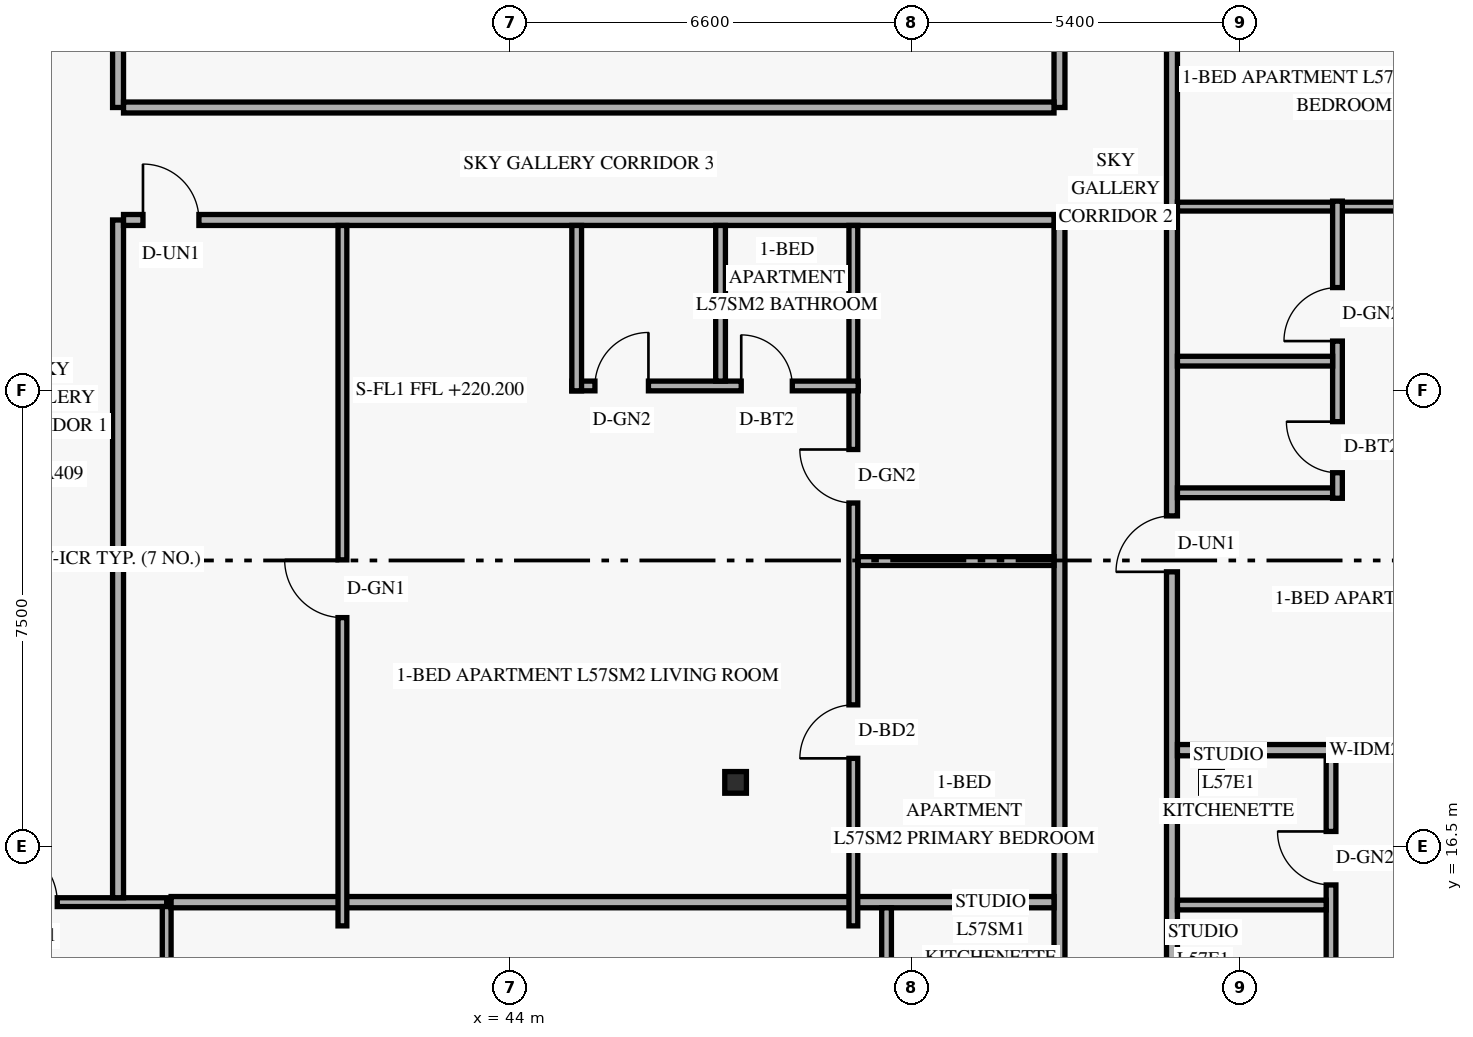
"""IFC4 building model, lengths in metres.
Left out: names, types, materials, properties, quantities, classifications, styles, units other than length and angle.
Written with IfcOpenShell. Run it as: python <this file> out.ifc"""

import sys

from ifc_helpers import new_model, si_unit, direction, frame, frame_2d, origin, origin_2d, place, context, subcontext, project, spatial, rectangle, hollow_rectangle, extrude, element, fill, save


model = new_model("IFC4")
c1 = context("Model", 3, precision=1e-05, world=origin(), true_north=direction((0.0, 1.0)))
c2 = subcontext(c1, "Body", "Model", "MODEL_VIEW")
j1 = project(units=[si_unit("LENGTHUNIT", "METRE"), si_unit("PLANEANGLEUNIT", "RADIAN")], contexts=[c1])
p1 = place(None, origin())
s1 = spatial("IfcSite", under=j1, at=p1, CompositionType="ELEMENT")
p2 = place(p1, origin())
s2 = spatial("IfcBuilding", under=s1, at=p2, CompositionType="ELEMENT")
p3 = place(p2, frame((0.0, 0.0, 220.2)))
s3 = spatial("IfcBuildingStorey", under=s2, at=p3, CompositionType="ELEMENT", Elevation=220.2)
p4 = place(p3, frame((47.643, 17.55, 0.0), z_axis=(0.034971136209, 0.0, 0.999388322742), x_axis=(0.0, 1.0, 0.0)))
e1 = element("IfcColumn", 1, at=p4, inside=s3, PredefinedType="COLUMN", context=c2, shape_type="SweptSolid", body=[
    extrude(hollow_rectangle(XDim=0.356, YDim=0.356, WallThickness=0.016, at=origin_2d()), origin(), (0.0, 0.0, 1.0), 3.602),
])
p5 = place(p3, frame((55.428, 17.55, 0.0), z_axis=(0.057884606321, 0.0, 0.998323280481), x_axis=(0.0, 1.0, 0.0)))
e2 = element("IfcColumn", 2, at=p5, inside=s3, PredefinedType="COLUMN", context=c2, shape_type="SweptSolid", body=[
    extrude(hollow_rectangle(XDim=0.356, YDim=0.356, WallThickness=0.016, at=origin_2d()), origin(), (0.0, 0.0, 1.0), 3.606),
])
p6 = place(p3, frame((32.722, 15.58, 0.0), z_axis=(0.0, 0.0, 1.0), x_axis=(1.0, 0.0, 0.0)))
e3 = element("IfcWall", 3, at=p6, inside=s3, PredefinedType="PARTITIONING", context=c2, shape_type="SweptSolid", body=[
    extrude(rectangle(XDim=5.628, YDim=0.145, at=frame_2d((2.814, 0.0))), origin(), (0.0, 0.0, 1.0), 2.803),
])
p7 = place(p6, frame((2.877, 0.0, 0.0)))
e4 = element("IfcOpeningElement", 4, at=p7, cuts=e3, PredefinedType="OPENING", context=c2, shape_type="SweptSolid", body=[
    extrude(rectangle(XDim=0.95, YDim=2.15, at=frame_2d((0.475, 1.075))), frame((0.0, 0.083, 0.0), z_axis=(0.0, -1.0, 0.0), x_axis=(1.0, 0.0, 0.0)), (0.0, 0.0, 1.0), 0.165),
])
p8 = place(p3, frame((38.35, 9.25, 0.0), z_axis=(0.0, 0.0, 1.0), x_axis=(0.0, 1.0, 0.0)))
e5 = element("IfcWall", 5, at=p8, inside=s3, PredefinedType="PARTITIONING", context=c2, shape_type="SweptSolid", body=[
    extrude(rectangle(XDim=6.258, YDim=0.145, at=frame_2d((3.129, 0.0))), origin(), (0.0, 0.0, 1.0), 2.803),
])
p9 = place(p3, frame((37.55, 15.653, 0.0), z_axis=(0.0, 0.0, 1.0), x_axis=(0.0, 1.0, 0.0)))
e6 = element("IfcWall", 6, at=p9, inside=s3, PredefinedType="STANDARD", context=c2, shape_type="SweptSolid", body=[
    extrude(rectangle(XDim=11.147, YDim=0.18, at=frame_2d((5.574, 0.0))), origin(), (0.0, 0.0, 1.0), 2.803),
])
p10 = place(p3, frame((37.55, 28.65, 0.0), z_axis=(0.0, 0.0, 1.0), x_axis=(0.0, 1.0, 0.0)))
e7 = element("IfcWall", 7, at=p10, inside=s3, PredefinedType="STANDARD", context=c2, shape_type="SweptSolid", body=[
    extrude(rectangle(XDim=2.628, YDim=0.18, at=frame_2d((1.314, 0.0))), origin(), (0.0, 0.0, 1.0), 2.803),
])
p11 = place(p3, frame((53.033, 5.77, 0.0), z_axis=(0.0, 0.0, 1.0), x_axis=(0.0, 1.0, 0.0)))
e8 = element("IfcWall", 8, at=p11, inside=s3, PredefinedType="STANDARD", context=c2, shape_type="SweptSolid", body=[
    extrude(rectangle(XDim=21.03, YDim=0.18, at=frame_2d((10.515, 0.0))), origin(), (0.0, 0.0, 1.0), 2.803),
])
p12 = place(p11, frame((3.87, 0.0, 0.0)))
e9 = element("IfcOpeningElement", 9, at=p12, cuts=e8, PredefinedType="OPENING", context=c2, shape_type="SweptSolid", body=[
    extrude(rectangle(XDim=0.92, YDim=2.15, at=frame_2d((0.46, 1.075))), frame((0.0, 0.1, 0.0), z_axis=(0.0, -1.0, 0.0), x_axis=(1.0, 0.0, 0.0)), (0.0, 0.0, 1.0), 0.2),
])
p13 = place(p3, frame((53.033, 28.65, 0.0), z_axis=(0.0, 0.0, 1.0), x_axis=(0.0, 1.0, 0.0)))
e10 = element("IfcWall", 10, at=p13, inside=s3, PredefinedType="STANDARD", context=c2, shape_type="SweptSolid", body=[
    extrude(rectangle(XDim=13.58, YDim=0.18, at=frame_2d((6.79, 0.0))), origin(), (0.0, 0.0, 1.0), 2.803),
])
p14 = place(p13, frame((4.2, 0.0, 0.0)))
e11 = element("IfcOpeningElement", 11, at=p14, cuts=e10, PredefinedType="OPENING", context=c2, shape_type="SweptSolid", body=[
    extrude(rectangle(XDim=0.92, YDim=2.15, at=frame_2d((0.46, 1.075))), frame((0.0, 0.1, 0.0), z_axis=(0.0, -1.0, 0.0), x_axis=(1.0, 0.0, 0.0)), (0.0, 0.0, 1.0), 0.2),
])
p15 = place(p3, frame((37.64, 26.8, 0.0), z_axis=(0.0, 0.0, 1.0), x_axis=(1.0, 0.0, 0.0)))
e12 = element("IfcWall", 12, at=p15, inside=s3, PredefinedType="STANDARD", context=c2, shape_type="SweptSolid", body=[
    extrude(rectangle(XDim=15.303, YDim=0.18, at=frame_2d((7.651, 0.0))), origin(), (0.0, 0.0, 1.0), 2.803),
])
p16 = place(p15, frame((0.32, 0.0, 0.0)))
e13 = element("IfcOpeningElement", 13, at=p16, cuts=e12, PredefinedType="OPENING", context=c2, shape_type="SweptSolid", body=[
    extrude(rectangle(XDim=0.92, YDim=2.15, at=frame_2d((0.46, 1.075))), frame((0.0, 0.1, 0.0), z_axis=(0.0, -1.0, 0.0), x_axis=(1.0, 0.0, 0.0)), (0.0, 0.0, 1.0), 0.2),
])
p17 = place(p3, frame((37.64, 28.65, 0.0), z_axis=(0.0, 0.0, 1.0), x_axis=(1.0, 0.0, 0.0)))
e14 = element("IfcWall", 14, at=p17, inside=s3, PredefinedType="STANDARD", context=c2, shape_type="SweptSolid", body=[
    extrude(rectangle(XDim=15.303, YDim=0.18, at=frame_2d((7.651, 0.0))), origin(), (0.0, 0.0, 1.0), 2.803),
])
p18 = place(p3, frame((54.883, 5.77, 0.0), z_axis=(0.0, 0.0, 1.0), x_axis=(0.0, 1.0, 0.0)))
e15 = element("IfcWall", 15, at=p18, inside=s3, PredefinedType="STANDARD", context=c2, shape_type="SweptSolid", body=[
    extrude(rectangle(XDim=36.46, YDim=0.18, at=frame_2d((18.23, 0.0))), origin(), (0.0, 0.0, 1.0), 2.803),
])
p19 = place(p18, frame((6.37, 0.0, 0.0)))
e16 = element("IfcOpeningElement", 16, at=p19, cuts=e15, PredefinedType="OPENING", context=c2, shape_type="SweptSolid", body=[
    extrude(rectangle(XDim=0.92, YDim=2.15, at=frame_2d((0.46, 1.075))), frame((0.0, 0.1, 0.0), z_axis=(0.0, -1.0, 0.0), x_axis=(1.0, 0.0, 0.0)), (0.0, 0.0, 1.0), 0.2),
])
p20 = place(p18, frame((15.243, 0.0, 0.0)))
e17 = element("IfcOpeningElement", 17, at=p20, cuts=e15, PredefinedType="OPENING", context=c2, shape_type="SweptSolid", body=[
    extrude(rectangle(XDim=0.92, YDim=2.15, at=frame_2d((0.46, 1.075))), frame((0.0, 0.1, 0.0), z_axis=(0.0, -1.0, 0.0), x_axis=(1.0, 0.0, 0.0)), (0.0, 0.0, 1.0), 0.2),
])
p21 = place(p18, frame((26.905, 0.0, 0.0)))
e18 = element("IfcOpeningElement", 18, at=p21, cuts=e15, PredefinedType="OPENING", context=c2, shape_type="SweptSolid", body=[
    extrude(rectangle(XDim=0.92, YDim=2.15, at=frame_2d((0.46, 1.075))), frame((0.0, 0.1, 0.0), z_axis=(0.0, -1.0, 0.0), x_axis=(1.0, 0.0, 0.0)), (0.0, 0.0, 1.0), 0.2),
])
p22 = place(p3, frame((57.499, 13.35, 0.0), z_axis=(0.0, 0.0, 1.0), x_axis=(0.0, 1.0, 0.0)))
e19 = element("IfcWall", 19, at=p22, inside=s3, PredefinedType="PLUMBINGWALL", context=c2, shape_type="SweptSolid", body=[
    extrude(rectangle(XDim=4.73, YDim=0.16, at=frame_2d((2.365, 0.0))), origin(), (0.0, 0.0, 1.0), 3.36),
])
p23 = place(p22, frame((0.42, 0.0, 0.0)))
e20 = element("IfcOpeningElement", 20, at=p23, cuts=e19, PredefinedType="OPENING", context=c2, shape_type="SweptSolid", body=[
    extrude(rectangle(XDim=0.84, YDim=2.12, at=frame_2d((0.42, 1.06))), frame((0.0, 0.09, 0.0), z_axis=(0.0, -1.0, 0.0), x_axis=(1.0, 0.0, 0.0)), (0.0, 0.0, 1.0), 0.18),
])
p24 = place(p22, frame((2.513, 0.0, 0.0)))
e21 = element("IfcOpeningElement", 21, at=p24, cuts=e19, PredefinedType="OPENING", context=c2, shape_type="SweptSolid", body=[
    extrude(rectangle(XDim=0.88, YDim=2.12, at=frame_2d((0.44, 1.06))), frame((0.0, 0.09, 0.0), z_axis=(0.0, -1.0, 0.0), x_axis=(1.0, 0.0, 0.0)), (0.0, 0.0, 1.0), 0.18),
])
p25 = place(p3, frame((54.973, 15.533, 0.0), z_axis=(0.0, 0.0, 1.0), x_axis=(1.0, 0.0, 0.0)))
e22 = element("IfcWall", 22, at=p25, inside=s3, PredefinedType="PLUMBINGWALL", context=c2, shape_type="SweptSolid", body=[
    extrude(rectangle(XDim=2.446, YDim=0.16, at=frame_2d((1.223, 0.0))), origin(), (0.0, 0.0, 1.0), 2.879),
])
p26 = place(p3, frame((54.973, 18.08, 0.0), z_axis=(0.0, 0.0, 1.0), x_axis=(1.0, 0.0, 0.0)))
e23 = element("IfcWall", 23, at=p26, inside=s3, PredefinedType="PARTITIONING", context=c2, shape_type="SweptSolid", body=[
    extrude(rectangle(XDim=7.157, YDim=0.185, at=frame_2d((3.579, 0.0))), origin(), (0.0, 0.0, 1.0), 2.879),
])
p27 = place(p3, frame((54.973, 27.02, 0.0), z_axis=(0.0, 0.0, 1.0), x_axis=(1.0, 0.0, 0.0)))
e24 = element("IfcWall", 24, at=p27, inside=s3, PredefinedType="PARTITIONING", context=c2, shape_type="SweptSolid", body=[
    extrude(rectangle(XDim=7.157, YDim=0.145, at=frame_2d((3.579, 0.0))), origin(), (0.0, 0.0, 1.0), 2.879),
])
p28 = place(p27, frame((4.594, 0.0, 0.0)))
e25 = element("IfcOpeningElement", 25, at=p28, cuts=e24, PredefinedType="OPENING", context=c2, shape_type="SweptSolid", body=[
    extrude(rectangle(XDim=0.9, YDim=2.14, at=frame_2d((0.45, 1.07))), frame((0.0, 0.083, 0.0), z_axis=(0.0, -1.0, 0.0), x_axis=(1.0, 0.0, 0.0)), (0.0, 0.0, 1.0), 0.165),
])
p29 = place(p3, frame((54.973, 22.313, 0.0), z_axis=(0.0, 0.0, 1.0), x_axis=(1.0, 0.0, 0.0)))
e26 = element("IfcWall", 26, at=p29, inside=s3, PredefinedType="PLUMBINGWALL", context=c2, shape_type="SweptSolid", body=[
    extrude(rectangle(XDim=2.712, YDim=0.16, at=frame_2d((1.356, 0.0))), origin(), (0.0, 0.0, 1.0), 2.879),
])
p30 = place(p3, frame((57.605, 22.223, 0.0), z_axis=(0.0, 0.0, 1.0), x_axis=(0.0, 1.0, 0.0)))
e27 = element("IfcWall", 27, at=p30, inside=s3, PredefinedType="PLUMBINGWALL", context=c2, shape_type="SweptSolid", body=[
    extrude(rectangle(XDim=4.887, YDim=0.16, at=frame_2d((2.444, 0.0))), origin(), (0.0, 0.0, 1.0), 3.36),
])
p31 = place(p30, frame((0.42, 0.0, 0.0)))
e28 = element("IfcOpeningElement", 28, at=p31, cuts=e27, PredefinedType="OPENING", context=c2, shape_type="SweptSolid", body=[
    extrude(rectangle(XDim=0.84, YDim=2.12, at=frame_2d((0.42, 1.06))), frame((0.0, 0.09, 0.0), z_axis=(0.0, -1.0, 0.0), x_axis=(1.0, 0.0, 0.0)), (0.0, 0.0, 1.0), 0.18),
])
p32 = place(p30, frame((2.585, 0.0, 0.0)))
e29 = element("IfcOpeningElement", 29, at=p32, cuts=e27, PredefinedType="OPENING", context=c2, shape_type="SweptSolid", body=[
    extrude(rectangle(XDim=0.88, YDim=2.12, at=frame_2d((0.44, 1.06))), frame((0.0, 0.09, 0.0), z_axis=(0.0, -1.0, 0.0), x_axis=(1.0, 0.0, 0.0)), (0.0, 0.0, 1.0), 0.18),
])
p33 = place(p3, frame((54.973, 24.478, 0.0), z_axis=(0.0, 0.0, 1.0), x_axis=(1.0, 0.0, 0.0)))
e30 = element("IfcWall", 30, at=p33, inside=s3, PredefinedType="PLUMBINGWALL", context=c2, shape_type="SweptSolid", body=[
    extrude(rectangle(XDim=2.552, YDim=0.16, at=frame_2d((1.276, 0.0))), origin(), (0.0, 0.0, 1.0), 2.879),
])
p34 = place(p3, frame((38.423, 15.58, 0.0), z_axis=(0.0, 0.0, 1.0), x_axis=(1.0, 0.0, 0.0)))
e31 = element("IfcWall", 31, at=p34, inside=s3, PredefinedType="PARTITIONING", context=c2, shape_type="SweptSolid", body=[
    extrude(rectangle(XDim=14.52, YDim=0.185, at=frame_2d((7.26, 0.0))), origin(), (0.0, 0.0, 1.0), 2.803),
])
p35 = place(p3, frame((50.189, 10.85, 0.0), z_axis=(0.0, 0.0, 1.0), x_axis=(0.0, 1.0, 0.0)))
e32 = element("IfcWall", 32, at=p35, inside=s3, PredefinedType="PLUMBINGWALL", context=c2, shape_type="SweptSolid", body=[
    extrude(rectangle(XDim=4.637, YDim=0.16, at=frame_2d((2.319, 0.0))), origin(), (0.0, 0.0, 1.0), 3.039),
])
p36 = place(p35, frame((0.42, 0.0, 0.0)))
e33 = element("IfcOpeningElement", 33, at=p36, cuts=e32, PredefinedType="OPENING", context=c2, shape_type="SweptSolid", body=[
    extrude(rectangle(XDim=0.84, YDim=2.12, at=frame_2d((0.42, 1.06))), frame((0.0, 0.09, 0.0), z_axis=(0.0, -1.0, 0.0), x_axis=(1.0, 0.0, 0.0)), (0.0, 0.0, 1.0), 0.18),
])
p37 = place(p35, frame((2.513, 0.0, 0.0)))
e34 = element("IfcOpeningElement", 34, at=p37, cuts=e32, PredefinedType="OPENING", context=c2, shape_type="SweptSolid", body=[
    extrude(rectangle(XDim=0.88, YDim=2.12, at=frame_2d((0.44, 1.06))), frame((0.0, 0.09, 0.0), z_axis=(0.0, -1.0, 0.0), x_axis=(1.0, 0.0, 0.0)), (0.0, 0.0, 1.0), 0.18),
])
p38 = place(p3, frame((49.643, 15.19, 0.0), z_axis=(0.0, 0.0, 1.0), x_axis=(0.0, 1.0, 0.0)))
e35 = element("IfcWall", 35, at=p38, inside=s3, PredefinedType="PARTITIONING", context=c2, shape_type="SweptSolid", body=[
    extrude(rectangle(XDim=11.52, YDim=0.145, at=frame_2d((5.76, 0.0))), origin(), (0.0, 0.0, 1.0), 2.803),
])
p39 = place(p38, frame((2.755, 0.0, 0.0)))
e36 = element("IfcOpeningElement", 36, at=p39, cuts=e35, PredefinedType="OPENING", context=c2, shape_type="SweptSolid", body=[
    extrude(rectangle(XDim=0.88, YDim=2.14, at=frame_2d((0.44, 1.07))), frame((0.0, 0.083, 0.0), z_axis=(0.0, -1.0, 0.0), x_axis=(1.0, 0.0, 0.0)), (0.0, 0.0, 1.0), 0.165),
])
p40 = place(p38, frame((6.955, 0.0, 0.0)))
e37 = element("IfcOpeningElement", 37, at=p40, cuts=e35, PredefinedType="OPENING", context=c2, shape_type="SweptSolid", body=[
    extrude(rectangle(XDim=0.88, YDim=2.12, at=frame_2d((0.44, 1.06))), frame((0.0, 0.083, 0.0), z_axis=(0.0, -1.0, 0.0), x_axis=(1.0, 0.0, 0.0)), (0.0, 0.0, 1.0), 0.165),
])
p41 = place(p3, frame((45.013, 24.07, 0.0), z_axis=(0.0, 0.0, 1.0), x_axis=(1.0, 0.0, 0.0)))
e38 = element("IfcWall", 38, at=p41, inside=s3, PredefinedType="PLUMBINGWALL", context=c2, shape_type="SweptSolid", body=[
    extrude(rectangle(XDim=4.71, YDim=0.16, at=frame_2d((2.355, 0.0))), origin(), (0.0, 0.0, 1.0), 2.803),
])
p42 = place(p41, frame((0.38, 0.0, 0.0)))
e39 = element("IfcOpeningElement", 39, at=p42, cuts=e38, PredefinedType="OPENING", context=c2, shape_type="SweptSolid", body=[
    extrude(rectangle(XDim=0.88, YDim=2.12, at=frame_2d((0.44, 1.06))), frame((0.0, 0.09, 0.0), z_axis=(0.0, -1.0, 0.0), x_axis=(1.0, 0.0, 0.0)), (0.0, 0.0, 1.0), 0.18),
])
p43 = place(p41, frame((2.786, 0.0, 0.0)))
e40 = element("IfcOpeningElement", 40, at=p43, cuts=e38, PredefinedType="OPENING", context=c2, shape_type="SweptSolid", body=[
    extrude(rectangle(XDim=0.84, YDim=2.12, at=frame_2d((0.42, 1.06))), frame((0.0, 0.09, 0.0), z_axis=(0.0, -1.0, 0.0), x_axis=(1.0, 0.0, 0.0)), (0.0, 0.0, 1.0), 0.18),
])
p44 = place(p3, frame((45.093, 23.99, 0.0), z_axis=(0.0, 0.0, 1.0), x_axis=(0.0, 1.0, 0.0)))
e41 = element("IfcWall", 41, at=p44, inside=s3, PredefinedType="PLUMBINGWALL", context=c2, shape_type="SweptSolid", body=[
    extrude(rectangle(XDim=2.72, YDim=0.16, at=frame_2d((1.36, 0.0))), origin(), (0.0, 0.0, 1.0), 3.36),
])
p45 = place(p3, frame((47.459, 24.15, 0.0), z_axis=(0.0, 0.0, 1.0), x_axis=(0.0, 1.0, 0.0)))
e42 = element("IfcWall", 42, at=p45, inside=s3, PredefinedType="PLUMBINGWALL", context=c2, shape_type="SweptSolid", body=[
    extrude(rectangle(XDim=2.56, YDim=0.16, at=frame_2d((1.28, 0.0))), origin(), (0.0, 0.0, 1.0), 3.36),
])
p46 = place(p3, frame((41.24, 15.19, 0.0), z_axis=(0.0, 0.0, 1.0), x_axis=(0.0, 1.0, 0.0)))
e43 = element("IfcWall", 43, at=p46, inside=s3, PredefinedType="PARTITIONING", context=c2, shape_type="SweptSolid", body=[
    extrude(rectangle(XDim=11.52, YDim=0.145, at=frame_2d((5.76, 0.0))), origin(), (0.0, 0.0, 1.0), 2.803),
])
p47 = place(p46, frame((5.07, 0.0, 0.0)))
e44 = element("IfcOpeningElement", 44, at=p47, cuts=e43, PredefinedType="OPENING", context=c2, shape_type="SweptSolid", body=[
    extrude(rectangle(XDim=0.95, YDim=2.15, at=frame_2d((0.475, 1.075))), frame((0.0, 0.083, 0.0), z_axis=(0.0, -1.0, 0.0), x_axis=(1.0, 0.0, 0.0)), (0.0, 0.0, 1.0), 0.165),
])
p48 = place(p3, frame((49.723, 21.19, 0.0), z_axis=(0.0, 0.0, 1.0), x_axis=(1.0, 0.0, 0.0)))
e45 = element("IfcWall", 45, at=p48, inside=s3, PredefinedType="PARTITIONING", context=c2, shape_type="SweptSolid", body=[
    extrude(rectangle(XDim=3.22, YDim=0.145, at=frame_2d((1.61, 0.0))), origin(), (0.0, 0.0, 1.0), 3.36),
])
p49 = place(p7, origin())
e46 = element("IfcDoor", 46, at=p49, inside=s3, OperationType="SINGLE_SWING_LEFT", PredefinedType="DOOR", context=c2, shape_type="SweptSolid", body=[
    extrude(rectangle(XDim=0.95, YDim=2.15, at=frame_2d((0.475, 1.075))), frame((0.0, 0.025, 0.0), z_axis=(0.0, -1.0, 0.0), x_axis=(1.0, 0.0, 0.0)), (0.0, 0.0, 1.0), 0.05),
])
fill(e4, e46)
p50 = place(p24, origin())
e47 = element("IfcDoor", 47, at=p50, inside=s3, OperationType="SINGLE_SWING_RIGHT", PredefinedType="DOOR", context=c2, shape_type="SweptSolid", body=[
    extrude(rectangle(XDim=0.88, YDim=2.12, at=frame_2d((0.44, 1.06))), frame((0.0, 0.025, 0.0), z_axis=(0.0, -1.0, 0.0), x_axis=(1.0, 0.0, 0.0)), (0.0, 0.0, 1.0), 0.05),
])
fill(e21, e47)
p51 = place(p20, origin())
e48 = element("IfcDoor", 48, at=p51, inside=s3, OperationType="SINGLE_SWING_LEFT", PredefinedType="DOOR", context=c2, shape_type="SweptSolid", body=[
    extrude(rectangle(XDim=0.92, YDim=2.15, at=frame_2d((0.46, 1.075))), frame((0.0, 0.025, 0.0), z_axis=(0.0, -1.0, 0.0), x_axis=(1.0, 0.0, 0.0)), (0.0, 0.0, 1.0), 0.05),
])
fill(e17, e48)
p52 = place(p31, origin())
e49 = element("IfcDoor", 49, at=p52, inside=s3, OperationType="SINGLE_SWING_RIGHT", PredefinedType="DOOR", context=c2, shape_type="SweptSolid", body=[
    extrude(rectangle(XDim=0.84, YDim=2.12, at=frame_2d((0.42, 1.06))), frame((0.0, 0.025, 0.0), z_axis=(0.0, -1.0, 0.0), x_axis=(1.0, 0.0, 0.0)), (0.0, 0.0, 1.0), 0.05),
])
fill(e28, e49)
p53 = place(p32, origin())
e50 = element("IfcDoor", 50, at=p53, inside=s3, OperationType="SINGLE_SWING_LEFT", PredefinedType="DOOR", context=c2, shape_type="SweptSolid", body=[
    extrude(rectangle(XDim=0.88, YDim=2.12, at=frame_2d((0.44, 1.06))), frame((0.0, 0.025, 0.0), z_axis=(0.0, -1.0, 0.0), x_axis=(1.0, 0.0, 0.0)), (0.0, 0.0, 1.0), 0.05),
])
fill(e29, e50)
p54 = place(p47, origin())
e51 = element("IfcDoor", 51, at=p54, inside=s3, OperationType="SINGLE_SWING_RIGHT", PredefinedType="DOOR", context=c2, shape_type="SweptSolid", body=[
    extrude(rectangle(XDim=0.95, YDim=2.15, at=frame_2d((0.475, 1.075))), frame((0.0, 0.025, 0.0), z_axis=(0.0, -1.0, 0.0), x_axis=(1.0, 0.0, 0.0)), (0.0, 0.0, 1.0), 0.05),
])
fill(e44, e51)
p55 = place(p16, origin())
e52 = element("IfcDoor", 52, at=p55, inside=s3, OperationType="SINGLE_SWING_LEFT", PredefinedType="DOOR", context=c2, shape_type="SweptSolid", body=[
    extrude(rectangle(XDim=0.92, YDim=2.15, at=frame_2d((0.46, 1.075))), frame((0.0, 0.025, 0.0), z_axis=(0.0, -1.0, 0.0), x_axis=(1.0, 0.0, 0.0)), (0.0, 0.0, 1.0), 0.05),
])
fill(e13, e52)
p56 = place(p42, origin())
e53 = element("IfcDoor", 53, at=p56, inside=s3, OperationType="SINGLE_SWING_RIGHT", PredefinedType="DOOR", context=c2, shape_type="SweptSolid", body=[
    extrude(rectangle(XDim=0.88, YDim=2.12, at=frame_2d((0.44, 1.06))), frame((0.0, 0.025, 0.0), z_axis=(0.0, -1.0, 0.0), x_axis=(1.0, 0.0, 0.0)), (0.0, 0.0, 1.0), 0.05),
])
fill(e39, e53)
p57 = place(p43, origin())
e54 = element("IfcDoor", 54, at=p57, inside=s3, OperationType="SINGLE_SWING_LEFT", PredefinedType="DOOR", context=c2, shape_type="SweptSolid", body=[
    extrude(rectangle(XDim=0.84, YDim=2.12, at=frame_2d((0.42, 1.06))), frame((0.0, 0.025, 0.0), z_axis=(0.0, -1.0, 0.0), x_axis=(1.0, 0.0, 0.0)), (0.0, 0.0, 1.0), 0.05),
])
fill(e40, e54)
p58 = place(p39, origin())
e55 = element("IfcDoor", 55, at=p58, inside=s3, OperationType="SINGLE_SWING_LEFT", PredefinedType="DOOR", context=c2, shape_type="SweptSolid", body=[
    extrude(rectangle(XDim=0.88, YDim=2.14, at=frame_2d((0.44, 1.07))), frame((0.0, 0.025, 0.0), z_axis=(0.0, -1.0, 0.0), x_axis=(1.0, 0.0, 0.0)), (0.0, 0.0, 1.0), 0.05),
])
fill(e36, e55)
p59 = place(p40, origin())
e56 = element("IfcDoor", 56, at=p59, inside=s3, OperationType="SINGLE_SWING_RIGHT", PredefinedType="DOOR", context=c2, shape_type="SweptSolid", body=[
    extrude(rectangle(XDim=0.88, YDim=2.12, at=frame_2d((0.44, 1.06))), frame((0.0, 0.025, 0.0), z_axis=(0.0, -1.0, 0.0), x_axis=(1.0, 0.0, 0.0)), (0.0, 0.0, 1.0), 0.05),
])
fill(e37, e56)
save(model, sys.argv[1])
